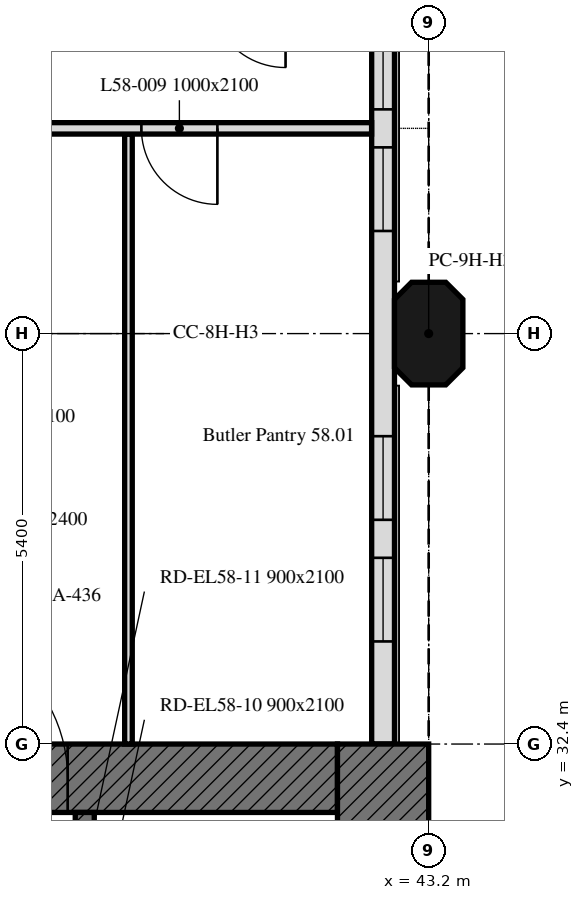
"""IFC4 building model, lengths in metres.
Left out: names, types, materials, properties, quantities, classifications, styles, units other than length and angle.
Written with IfcOpenShell. Run it as: python <this file> out.ifc"""

import sys

from ifc_helpers import new_model, si_unit, direction, frame, frame_2d, origin, place, context, subcontext, project, spatial, polyline, rectangle, outline, extrude, element, fill, save


model = new_model("IFC4")
c1 = context("Model", 3, precision=1e-05, world=origin(), true_north=direction((0.0, 1.0)))
c2 = subcontext(c1, "Body", "Model", "MODEL_VIEW")
j1 = project(units=[si_unit("LENGTHUNIT", "METRE"), si_unit("PLANEANGLEUNIT", "RADIAN")], contexts=[c1])
p1 = place(None, origin())
s1 = spatial("IfcSite", under=j1, at=p1, CompositionType="ELEMENT")
p2 = place(p1, origin())
s2 = spatial("IfcBuilding", under=s1, at=p2, CompositionType="ELEMENT")
p3 = place(p2, frame((0.0, 0.0, 230.2)))
s3 = spatial("IfcBuildingStorey", under=s2, at=p3, CompositionType="ELEMENT", Elevation=230.2)
p4 = place(p3, frame((43.2, 37.8, 0.0), z_axis=(0.0, 0.0, 1.0), x_axis=(0.0, 1.0, 0.0)))
e1 = element("IfcColumn", 1, at=p4, inside=s3, PredefinedType="COLUMN", context=c2, shape_type="SweptSolid", body=[
    extrude(outline(polyline([(-0.45, -0.45), (0.45, -0.45), (0.675, -0.225), (0.675, 0.225), (0.45, 0.45), (-0.45, 0.45), (-0.675, 0.225), (-0.675, -0.225), (-0.45, -0.45)])), origin(), (0.0, 0.0, 1.0), 2.8),
])
p5 = place(p3, frame((42.6, 32.4, 0.0), z_axis=(0.0, 0.0, 1.0), x_axis=(0.0, 1.0, 0.0)))
e2 = element("IfcWall", 2, at=p5, inside=s3, PredefinedType="SOLIDWALL", context=c2, shape_type="SweptSolid", body=[
    extrude(rectangle(XDim=10.614, YDim=0.3, at=frame_2d((5.307, 0.0))), origin(), (0.0, 0.0, 1.0), 2.8),
])
p6 = place(p5, frame((1.35, 0.0, 0.9)))
e3 = element("IfcOpeningElement", 3, at=p6, cuts=e2, PredefinedType="OPENING", context=c2, shape_type="SweptSolid", body=[
    extrude(rectangle(XDim=1.1, YDim=1.7, at=frame_2d((0.55, 0.85))), frame((0.0, 0.16, 0.0), z_axis=(0.0, -1.0, 0.0), x_axis=(1.0, 0.0, 0.0)), (0.0, 0.0, 1.0), 0.32),
])
p7 = place(p5, frame((2.95, 0.0, 0.9)))
e4 = element("IfcOpeningElement", 4, at=p7, cuts=e2, PredefinedType="OPENING", context=c2, shape_type="SweptSolid", body=[
    extrude(rectangle(XDim=1.1, YDim=1.7, at=frame_2d((0.55, 0.85))), frame((0.0, 0.16, 0.0), z_axis=(0.0, -1.0, 0.0), x_axis=(1.0, 0.0, 0.0)), (0.0, 0.0, 1.0), 0.32),
])
p8 = place(p5, frame((6.75, 0.0, 0.9)))
e5 = element("IfcOpeningElement", 5, at=p8, cuts=e2, PredefinedType="OPENING", context=c2, shape_type="SweptSolid", body=[
    extrude(rectangle(XDim=1.1, YDim=1.7, at=frame_2d((0.55, 0.85))), frame((0.0, 0.16, 0.0), z_axis=(0.0, -1.0, 0.0), x_axis=(1.0, 0.0, 0.0)), (0.0, 0.0, 1.0), 0.32),
])
p9 = place(p5, frame((8.35, 0.0, 0.9)))
e6 = element("IfcOpeningElement", 6, at=p9, cuts=e2, PredefinedType="OPENING", context=c2, shape_type="SweptSolid", body=[
    extrude(rectangle(XDim=1.1, YDim=1.7, at=frame_2d((0.55, 0.85))), frame((0.0, 0.16, 0.0), z_axis=(0.0, -1.0, 0.0), x_axis=(1.0, 0.0, 0.0)), (0.0, 0.0, 1.0), 0.32),
])
p10 = place(p3, frame((30.9, 31.95, 0.0), z_axis=(0.0, 0.0, 1.0), x_axis=(1.0, 0.0, 0.0)))
e7 = element("IfcWall", 7, at=p10, inside=s3, PredefinedType="SOLIDWALL", context=c2, shape_type="SweptSolid", body=[
    extrude(rectangle(XDim=11.1, YDim=0.9, at=frame_2d((5.55, 0.0))), origin(), (0.0, 0.0, 1.0), 2.8),
])
p11 = place(p10, frame((5.55, 0.0, 0.0)))
e8 = element("IfcOpeningElement", 8, at=p11, cuts=e7, PredefinedType="OPENING", context=c2, shape_type="SweptSolid", body=[
    extrude(rectangle(XDim=2.0, YDim=2.4, at=frame_2d((1.0, 1.2))), frame((0.0, 0.45, 0.0), z_axis=(0.0, -1.0, 0.0), x_axis=(1.0, 0.0, 0.0)), (0.0, 0.0, 1.0), 0.9),
])
p12 = place(p3, frame((42.6, 32.4, 0.0), z_axis=(0.0, 0.0, 1.0), x_axis=(0.0, -1.0, 0.0)))
e9 = element("IfcWall", 9, at=p12, inside=s3, PredefinedType="SOLIDWALL", context=c2, shape_type="SweptSolid", body=[
    extrude(rectangle(XDim=16.2, YDim=1.2, at=frame_2d((8.1, 0.0))), origin(), (0.0, 0.0, 1.0), 2.8),
])
p13 = place(p3, frame((38.675, 17.1, 0.0), z_axis=(0.0, 0.0, 1.0), x_axis=(0.0, 1.0, 0.0)))
e10 = element("IfcWall", 10, at=p13, inside=s3, PredefinedType="SOLIDWALL", context=c2, shape_type="SweptSolid", body=[
    extrude(rectangle(XDim=14.4, YDim=0.25, at=frame_2d((7.2, 0.0))), origin(), (0.0, 0.0, 1.0), 2.8),
])
p14 = place(p13, frame((4.6, 0.0, 0.0)))
e11 = element("IfcOpeningElement", 11, at=p14, cuts=e10, PredefinedType="OPENING", context=c2, shape_type="SweptSolid", body=[
    extrude(rectangle(XDim=1.0, YDim=2.1, at=frame_2d((0.5, 1.05))), frame((0.0, 0.125, 0.0), z_axis=(0.0, -1.0, 0.0), x_axis=(1.0, 0.0, 0.0)), (0.0, 0.0, 1.0), 0.25),
])
p15 = place(p13, frame((7.062, 0.0, 0.0)))
e12 = element("IfcOpeningElement", 12, at=p15, cuts=e10, PredefinedType="OPENING", context=c2, shape_type="SweptSolid", body=[
    extrude(rectangle(XDim=1.2, YDim=2.1, at=frame_2d((0.6, 1.05))), frame((0.0, 0.125, 0.0), z_axis=(0.0, -1.0, 0.0), x_axis=(1.0, 0.0, 0.0)), (0.0, 0.0, 1.0), 0.25),
])
p16 = place(p13, frame((9.726, 0.0, 0.0)))
e13 = element("IfcOpeningElement", 13, at=p16, cuts=e10, PredefinedType="OPENING", context=c2, shape_type="SweptSolid", body=[
    extrude(rectangle(XDim=0.9, YDim=2.1, at=frame_2d((0.45, 1.05))), frame((0.0, 0.125, 0.0), z_axis=(0.0, -1.0, 0.0), x_axis=(1.0, 0.0, 0.0)), (0.0, 0.0, 1.0), 0.25),
])
p17 = place(p13, frame((11.539, 0.0, 0.0)))
e14 = element("IfcOpeningElement", 14, at=p17, cuts=e10, PredefinedType="OPENING", context=c2, shape_type="SweptSolid", body=[
    extrude(rectangle(XDim=0.9, YDim=2.1, at=frame_2d((0.45, 1.05))), frame((0.0, 0.125, 0.0), z_axis=(0.0, -1.0, 0.0), x_axis=(1.0, 0.0, 0.0)), (0.0, 0.0, 1.0), 0.25),
])
p18 = place(p13, frame((13.226, 0.0, 0.0)))
e15 = element("IfcOpeningElement", 15, at=p18, cuts=e10, PredefinedType="OPENING", context=c2, shape_type="SweptSolid", body=[
    extrude(rectangle(XDim=0.9, YDim=2.1, at=frame_2d((0.45, 1.05))), frame((0.0, 0.125, 0.0), z_axis=(0.0, -1.0, 0.0), x_axis=(1.0, 0.0, 0.0)), (0.0, 0.0, 1.0), 0.25),
])
p19 = place(p3, frame((39.25, 32.4, 0.0), z_axis=(0.0, 0.0, 1.0), x_axis=(0.0, 1.0, 0.0)))
e16 = element("IfcWall", 16, at=p19, inside=s3, PredefinedType="PARTITIONING", context=c2, shape_type="SweptSolid", body=[
    extrude(rectangle(XDim=8.025, YDim=0.1, at=frame_2d((4.013, 0.0))), origin(), (0.0, 0.0, 1.0), 2.8),
])
p20 = place(p3, frame((42.449, 40.5, 0.0), z_axis=(0.0, 0.0, 1.0), x_axis=(-1.0, 0.0, 0.0)))
e17 = element("IfcWall", 17, at=p20, inside=s3, PredefinedType="PARTITIONING", context=c2, shape_type="SweptSolid", body=[
    extrude(rectangle(XDim=36.974, YDim=0.15, at=frame_2d((18.487, 0.0))), origin(), (0.0, 0.0, 1.0), 2.2),
])
p21 = place(p20, frame((17.649, 0.0, 0.0)))
e18 = element("IfcOpeningElement", 18, at=p21, cuts=e17, PredefinedType="OPENING", context=c2, shape_type="SweptSolid", body=[
    extrude(rectangle(XDim=1.0, YDim=2.1, at=frame_2d((0.5, 1.05))), frame((0.0, 0.075, 0.0), z_axis=(0.0, -1.0, 0.0), x_axis=(1.0, 0.0, 0.0)), (0.0, 0.0, 1.0), 0.15),
])
p22 = place(p20, frame((2.029, 0.0, 0.0)))
e19 = element("IfcOpeningElement", 19, at=p22, cuts=e17, PredefinedType="OPENING", context=c2, shape_type="SweptSolid", body=[
    extrude(rectangle(XDim=1.0, YDim=2.1, at=frame_2d((0.5, 1.05))), frame((0.0, 0.075, 0.0), z_axis=(0.0, -1.0, 0.0), x_axis=(1.0, 0.0, 0.0)), (0.0, 0.0, 1.0), 0.15),
])
p23 = place(p20, frame((27.374, 0.0, 0.0)))
e20 = element("IfcOpeningElement", 20, at=p23, cuts=e17, PredefinedType="OPENING", context=c2, shape_type="SweptSolid", body=[
    extrude(rectangle(XDim=1.0, YDim=2.1, at=frame_2d((0.5, 1.05))), frame((0.0, 0.075, 0.0), z_axis=(0.0, -1.0, 0.0), x_axis=(1.0, 0.0, 0.0)), (0.0, 0.0, 1.0), 0.15),
])
p24 = place(p20, frame((7.924, 0.0, 0.0)))
e21 = element("IfcOpeningElement", 21, at=p24, cuts=e17, PredefinedType="OPENING", context=c2, shape_type="SweptSolid", body=[
    extrude(rectangle(XDim=1.0, YDim=2.1, at=frame_2d((0.5, 1.05))), frame((0.0, 0.075, 0.0), z_axis=(0.0, -1.0, 0.0), x_axis=(1.0, 0.0, 0.0)), (0.0, 0.0, 1.0), 0.15),
])
p25 = place(p20, frame((4.699, 0.0, 0.0)))
e22 = element("IfcOpeningElement", 22, at=p25, cuts=e17, PredefinedType="OPENING", context=c2, shape_type="SweptSolid", body=[
    extrude(rectangle(XDim=1.8, YDim=2.4, at=frame_2d((0.9, 1.2))), frame((0.0, 0.075, 0.0), z_axis=(0.0, -1.0, 0.0), x_axis=(1.0, 0.0, 0.0)), (0.0, 0.0, 1.0), 0.15),
])
p26 = place(p20, frame((30.199, 0.0, 0.0)))
e23 = element("IfcOpeningElement", 23, at=p26, cuts=e17, PredefinedType="OPENING", context=c2, shape_type="SweptSolid", body=[
    extrude(rectangle(XDim=1.0, YDim=2.1, at=frame_2d((0.5, 1.05))), frame((0.0, 0.075, 0.0), z_axis=(0.0, -1.0, 0.0), x_axis=(1.0, 0.0, 0.0)), (0.0, 0.0, 1.0), 0.15),
])
p27 = place(p6, origin())
e24 = element("IfcWindow", 24, at=p27, inside=s3, PartitioningType="SINGLE_PANEL", PredefinedType="WINDOW", context=c2, shape_type="SweptSolid", body=[
    extrude(rectangle(XDim=1.1, YDim=1.7, at=frame_2d((0.55, 0.85))), frame((0.0, 0.03, 0.0), z_axis=(0.0, -1.0, 0.0), x_axis=(1.0, 0.0, 0.0)), (0.0, 0.0, 1.0), 0.06),
])
fill(e3, e24)
p28 = place(p7, origin())
e25 = element("IfcWindow", 25, at=p28, inside=s3, PartitioningType="SINGLE_PANEL", PredefinedType="WINDOW", context=c2, shape_type="SweptSolid", body=[
    extrude(rectangle(XDim=1.1, YDim=1.7, at=frame_2d((0.55, 0.85))), frame((0.0, 0.03, 0.0), z_axis=(0.0, -1.0, 0.0), x_axis=(1.0, 0.0, 0.0)), (0.0, 0.0, 1.0), 0.06),
])
fill(e4, e25)
p29 = place(p8, origin())
e26 = element("IfcWindow", 26, at=p29, inside=s3, PartitioningType="SINGLE_PANEL", PredefinedType="WINDOW", context=c2, shape_type="SweptSolid", body=[
    extrude(rectangle(XDim=1.1, YDim=1.7, at=frame_2d((0.55, 0.85))), frame((0.0, 0.03, 0.0), z_axis=(0.0, -1.0, 0.0), x_axis=(1.0, 0.0, 0.0)), (0.0, 0.0, 1.0), 0.06),
])
fill(e5, e26)
p30 = place(p9, origin())
e27 = element("IfcWindow", 27, at=p30, inside=s3, PartitioningType="SINGLE_PANEL", PredefinedType="WINDOW", context=c2, shape_type="SweptSolid", body=[
    extrude(rectangle(XDim=1.1, YDim=1.7, at=frame_2d((0.55, 0.85))), frame((0.0, 0.03, 0.0), z_axis=(0.0, -1.0, 0.0), x_axis=(1.0, 0.0, 0.0)), (0.0, 0.0, 1.0), 0.06),
])
fill(e6, e27)
p31 = place(p11, origin())
e28 = element("IfcDoor", 28, at=p31, inside=s3, OperationType="DOUBLE_DOOR_SINGLE_SWING", PredefinedType="DOOR", context=c2, shape_type="SweptSolid", body=[
    extrude(rectangle(XDim=2.0, YDim=2.4, at=frame_2d((1.0, 1.2))), frame((0.0, 0.025, 0.0), z_axis=(0.0, -1.0, 0.0), x_axis=(1.0, 0.0, 0.0)), (0.0, 0.0, 1.0), 0.05),
])
fill(e8, e28)
p32 = place(p22, origin())
e29 = element("IfcDoor", 29, at=p32, inside=s3, OperationType="SINGLE_SWING_LEFT", PredefinedType="DOOR", context=c2, shape_type="SweptSolid", body=[
    extrude(rectangle(XDim=1.0, YDim=2.1, at=frame_2d((0.5, 1.05))), frame((0.0, 0.025, 0.0), z_axis=(0.0, -1.0, 0.0), x_axis=(1.0, 0.0, 0.0)), (0.0, 0.0, 1.0), 0.05),
])
fill(e19, e29)
save(model, sys.argv[1])
